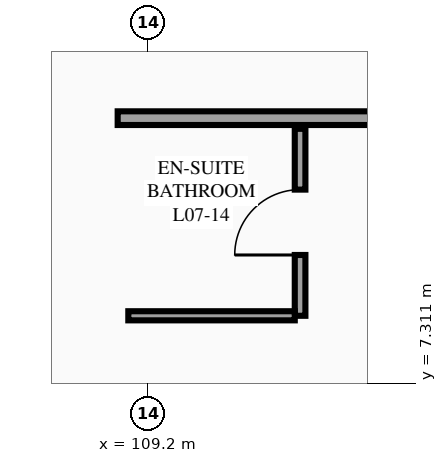
"""IFC4 building model, lengths in metres.
Left out: names, types, materials, properties, quantities, classifications, styles, units other than length and angle.
Written with IfcOpenShell. Run it as: python <this file> out.ifc"""

import sys

from ifc_helpers import new_model, si_unit, direction, frame, frame_2d, origin, place, context, subcontext, project, spatial, rectangle, extrude, element, fill, save


model = new_model("IFC4")
c1 = context("Model", 3, precision=1e-05, world=origin(), true_north=direction((0.0, 1.0)))
c2 = subcontext(c1, "Body", "Model", "MODEL_VIEW")
j1 = project(units=[si_unit("LENGTHUNIT", "METRE"), si_unit("PLANEANGLEUNIT", "RADIAN")], contexts=[c1])
p1 = place(None, origin())
s1 = spatial("IfcSite", under=j1, at=p1, CompositionType="ELEMENT")
p2 = place(p1, origin())
s2 = spatial("IfcBuilding", under=s1, at=p2, CompositionType="ELEMENT")
p3 = place(p2, frame((0.0, 0.0, 29.1)))
s3 = spatial("IfcBuildingStorey", under=s2, at=p3, CompositionType="ELEMENT", Elevation=29.1)
p4 = place(p3, frame((108.8, 10.8, 0.0), z_axis=(0.0, 0.0, 1.0), x_axis=(1.0, 0.0, 0.0)))
e1 = element("IfcWall", 1, at=p4, inside=s3, PredefinedType="PARTITIONING", context=c2, shape_type="SweptSolid", body=[
    extrude(rectangle(XDim=6.88, YDim=0.18, at=frame_2d((3.44, 0.0))), origin(), (0.0, 0.0, 1.0), 3.375),
])
p5 = place(p4, frame((4.653, 0.0, 0.0)))
e2 = element("IfcOpeningElement", 2, at=p5, cuts=e1, PredefinedType="OPENING", context=c2, shape_type="SweptSolid", body=[
    extrude(rectangle(XDim=0.96, YDim=2.15, at=frame_2d((0.48, 1.075))), frame((0.0, 0.1, 0.0), z_axis=(0.0, -1.0, 0.0), x_axis=(1.0, 0.0, 0.0)), (0.0, 0.0, 1.0), 0.2),
])
p6 = place(p3, frame((111.2, 8.2, 0.0), z_axis=(0.0, 0.0, 1.0), x_axis=(0.0, 1.0, 0.0)))
e3 = element("IfcWall", 3, at=p6, inside=s3, PredefinedType="PARTITIONING", context=c2, shape_type="SweptSolid", body=[
    extrude(rectangle(XDim=2.46, YDim=0.14, at=frame_2d((1.23, 0.0))), origin(), (0.0, 0.0, 1.0), 3.375),
])
p7 = place(p6, frame((0.8, 0.0, 0.0)))
e4 = element("IfcOpeningElement", 4, at=p7, cuts=e3, PredefinedType="OPENING", context=c2, shape_type="SweptSolid", body=[
    extrude(rectangle(XDim=0.86, YDim=2.1, at=frame_2d((0.43, 1.05))), frame((0.0, 0.08, 0.0), z_axis=(0.0, -1.0, 0.0), x_axis=(1.0, 0.0, 0.0)), (0.0, 0.0, 1.0), 0.16),
])
p8 = place(p3, frame((108.94, 8.2, 0.0), z_axis=(0.0, 0.0, 1.0), x_axis=(1.0, 0.0, 0.0)))
e5 = element("IfcWall", 5, at=p8, inside=s3, PredefinedType="PARTITIONING", context=c2, shape_type="SweptSolid", body=[
    extrude(rectangle(XDim=2.19, YDim=0.12, at=frame_2d((1.095, 0.0))), origin(), (0.0, 0.0, 1.0), 3.375),
])
p9 = place(p7, origin())
e6 = element("IfcDoor", 6, at=p9, inside=s3, OperationType="SINGLE_SWING_LEFT", PredefinedType="DOOR", context=c2, shape_type="SweptSolid", body=[
    extrude(rectangle(XDim=0.86, YDim=2.1, at=frame_2d((0.43, 1.05))), frame((0.0, 0.025, 0.0), z_axis=(0.0, -1.0, 0.0), x_axis=(1.0, 0.0, 0.0)), (0.0, 0.0, 1.0), 0.05),
])
fill(e4, e6)
save(model, sys.argv[1])
